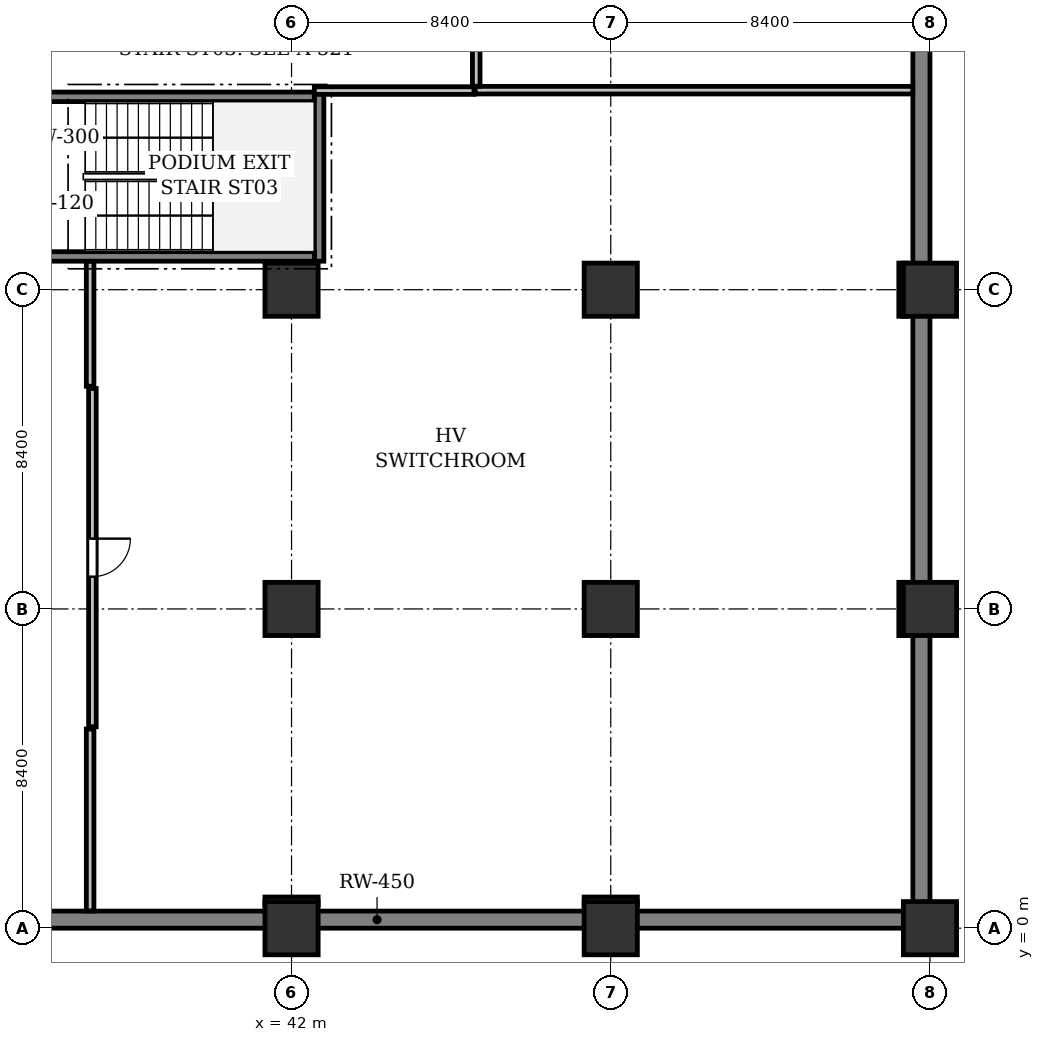
"""IFC4 building model, lengths in metres.
Left out: names, types, materials, properties, quantities, classifications, styles, units other than length and angle.
Written with IfcOpenShell. Run it as: python <this file> out.ifc"""

import sys

from ifc_helpers import new_model, si_unit, direction, frame, frame_2d, origin, origin_2d, place, context, subcontext, project, spatial, rectangle, extrude, element, fill, save


model = new_model("IFC4")
c1 = context("Model", 3, precision=1e-05, world=origin(), true_north=direction((0.0, 1.0)))
c2 = subcontext(c1, "Body", "Model", "MODEL_VIEW")
j1 = project(units=[si_unit("LENGTHUNIT", "METRE"), si_unit("PLANEANGLEUNIT", "RADIAN")], contexts=[c1])
p1 = place(None, origin())
s1 = spatial("IfcSite", under=j1, at=p1, CompositionType="ELEMENT")
p2 = place(p1, origin())
s2 = spatial("IfcBuilding", under=s1, at=p2, CompositionType="ELEMENT")
p3 = place(p2, frame((0.0, 0.0, -9.6)))
s3 = spatial("IfcBuildingStorey", under=s2, at=p3, CompositionType="ELEMENT", Elevation=-9.6)
p4 = place(p3, frame((29.7, 0.225, 0.0), z_axis=(0.0, 0.0, 1.0), x_axis=(1.0, 0.0, 0.0)))
e1 = element("IfcWall", 1, at=p4, inside=s3, PredefinedType="SOLIDWALL", context=c2, shape_type="SweptSolid", body=[
    extrude(rectangle(XDim=29.1, YDim=0.45, at=frame_2d((14.55, 0.0))), origin(), (0.0, 0.0, 1.0), 4.48),
])
p5 = place(p3, frame((58.575, 0.45, 0.0), z_axis=(0.0, 0.0, 1.0), x_axis=(0.0, 1.0, 0.0)))
e2 = element("IfcWall", 2, at=p5, inside=s3, PredefinedType="SOLIDWALL", context=c2, shape_type="SweptSolid", body=[
    extrude(rectangle(XDim=49.5, YDim=0.45, at=frame_2d((24.75, 0.0))), origin(), (0.0, 0.0, 1.0), 4.48),
])
for number, where, z_axis, x_axis in (
    (3, (42.0, 0.0, 0.0), (0.0, 0.0, 1.0), (1.0, 0.0, 0.0)),
    (4, (42.0, 8.4, 0.0), (0.0, 0.0, 1.0), (1.0, 0.0, 0.0)),
    (5, (42.0, 16.8, 0.0), (0.0, 0.0, 1.0), (1.0, 0.0, 0.0)),
    (6, (50.4, 0.0, 0.0), (0.0, 0.0, 1.0), (1.0, 0.0, 0.0)),
    (7, (50.4, 8.4, 0.0), (0.0, 0.0, 1.0), (1.0, 0.0, 0.0)),
    (8, (50.4, 16.8, 0.0), (0.0, 0.0, 1.0), (1.0, 0.0, 0.0)),
    (9, (58.8, 0.0, 0.0), (0.0, 0.0, 1.0), (1.0, 0.0, 0.0)),
    (10, (58.8, 8.4, 0.0), (0.0, 0.0, 1.0), (1.0, 0.0, 0.0)),
    (11, (58.8, 16.8, 0.0), (0.0, 0.0, 1.0), (1.0, 0.0, 0.0)),
):
    element("IfcColumn", number, at=place(p3, frame(where, z_axis=z_axis, x_axis=x_axis)), inside=s3, PredefinedType="COLUMN", context=c2, shape_type="SweptSolid", body=[
        extrude(rectangle(XDim=1.4, YDim=1.4, at=origin_2d()), origin(), (0.0, 0.0, 1.0), 4.8),
    ])
p6 = place(p3, frame((42.725, 17.55, 0.0), z_axis=(0.0, 0.0, 1.0), x_axis=(0.0, 1.0, 0.0)))
e12 = element("IfcWall", 12, at=p6, inside=s3, PredefinedType="SHEAR", context=c2, shape_type="SweptSolid", body=[
    extrude(rectangle(XDim=4.45, YDim=0.25, at=frame_2d((2.225, 0.0))), origin(), (0.0, 0.0, 1.0), 4.48),
])
for number, where, z_axis, x_axis in (
    (13, (34.65, 17.675, 0.0), (0.0, 0.0, 1.0), (1.0, 0.0, 0.0)),
    (14, (34.65, 21.875, 0.0), (0.0, 0.0, 1.0), (1.0, 0.0, 0.0)),
):
    element("IfcWall", number, at=place(p3, frame(where, z_axis=z_axis, x_axis=x_axis)), inside=s3, PredefinedType="SHEAR", context=c2, shape_type="SweptSolid", body=[
        extrude(rectangle(XDim=7.95, YDim=0.25, at=frame_2d((3.975, 0.0))), origin(), (0.0, 0.0, 1.0), 4.48),
    ])
p7 = place(p3, frame((41.3, 0.72, 0.0), z_axis=(0.0, 0.0, 1.0), x_axis=(1.0, 0.0, 0.0)))
e15 = element("IfcWall", 15, at=p7, inside=s3, PredefinedType="PARTITIONING", context=c2, shape_type="SweptSolid", body=[
    extrude(rectangle(XDim=1.4, YDim=0.2, at=frame_2d((0.7, 0.0))), origin(), (0.0, 0.0, 1.0), 3.868),
])
p8 = place(p3, frame((49.7, 0.72, 0.0), z_axis=(0.0, 0.0, 1.0), x_axis=(1.0, 0.0, 0.0)))
e16 = element("IfcWall", 16, at=p8, inside=s3, PredefinedType="PARTITIONING", context=c2, shape_type="SweptSolid", body=[
    extrude(rectangle(XDim=1.4, YDim=0.2, at=frame_2d((0.7, 0.0))), origin(), (0.0, 0.0, 1.0), 3.868),
])
p9 = place(p3, frame((58.08, 7.7, 0.0), z_axis=(0.0, 0.0, 1.0), x_axis=(0.0, 1.0, 0.0)))
e17 = element("IfcWall", 17, at=p9, inside=s3, PredefinedType="PARTITIONING", context=c2, shape_type="SweptSolid", body=[
    extrude(rectangle(XDim=1.4, YDim=0.2, at=frame_2d((0.7, 0.0))), origin(), (0.0, 0.0, 1.0), 3.78),
])
p10 = place(p3, frame((58.08, 16.1, 0.0), z_axis=(0.0, 0.0, 1.0), x_axis=(0.0, 1.0, 0.0)))
e18 = element("IfcWall", 18, at=p10, inside=s3, PredefinedType="PARTITIONING", context=c2, shape_type="SweptSolid", body=[
    extrude(rectangle(XDim=1.4, YDim=0.2, at=frame_2d((0.7, 0.0))), origin(), (0.0, 0.0, 1.0), 3.78),
])
p11 = place(p3, frame((58.346, 22.05, 0.0), z_axis=(0.0, 0.0, 1.0), x_axis=(-1.0, 0.0, 0.0)))
e19 = element("IfcWall", 19, at=p11, inside=s3, PredefinedType="PARTITIONING", context=c2, shape_type="SweptSolid", body=[
    extrude(rectangle(XDim=11.513, YDim=0.2, at=frame_2d((5.756, 0.0))), origin(), (0.0, 0.0, 1.0), 3.868),
])
p12 = place(p3, frame((46.8, 22.04, 0.0), z_axis=(0.0, 0.0, 1.0), x_axis=(-1.0, 0.0, 0.0)))
e20 = element("IfcWall", 20, at=p12, inside=s3, PredefinedType="PARTITIONING", context=c2, shape_type="SweptSolid", body=[
    extrude(rectangle(XDim=4.2, YDim=0.2, at=frame_2d((2.1, 0.0))), origin(), (0.0, 0.0, 1.0), 4.074),
])
p13 = place(p3, frame((36.7, 17.546, 0.0), z_axis=(0.0, 0.0, 1.0), x_axis=(0.0, -1.0, 0.0)))
e21 = element("IfcWall", 21, at=p13, inside=s3, PredefinedType="PARTITIONING", context=c2, shape_type="SweptSolid", body=[
    extrude(rectangle(XDim=3.286, YDim=0.2, at=frame_2d((1.643, 0.0))), origin(), (0.0, 0.0, 1.0), 3.78),
])
p14 = place(p3, frame((36.76, 14.2, 0.0), z_axis=(0.0, 0.0, 1.0), x_axis=(0.0, -1.0, 0.0)))
e22 = element("IfcWall", 22, at=p14, inside=s3, PredefinedType="PARTITIONING", context=c2, shape_type="SweptSolid", body=[
    extrude(rectangle(XDim=8.9, YDim=0.2, at=frame_2d((4.45, 0.0))), origin(), (0.0, 0.0, 1.0), 3.78),
])
p15 = place(p14, frame((3.95, 0.0, 0.0)))
e23 = element("IfcOpeningElement", 23, at=p15, cuts=e22, PredefinedType="OPENING", context=c2, shape_type="SweptSolid", body=[
    extrude(rectangle(XDim=1.0, YDim=2.15, at=frame_2d((0.5, 1.075))), frame((0.0, 0.11, 0.0), z_axis=(0.0, -1.0, 0.0), x_axis=(1.0, 0.0, 0.0)), (0.0, 0.0, 1.0), 0.22),
])
p16 = place(p3, frame((36.7, 5.24, 0.0), z_axis=(0.0, 0.0, 1.0), x_axis=(0.0, -1.0, 0.0)))
e24 = element("IfcWall", 24, at=p16, inside=s3, PredefinedType="PARTITIONING", context=c2, shape_type="SweptSolid", body=[
    extrude(rectangle(XDim=4.786, YDim=0.2, at=frame_2d((2.393, 0.0))), origin(), (0.0, 0.0, 1.0), 4.48),
])
p17 = place(p3, frame((46.86, 24.35, 0.0), z_axis=(0.0, 0.0, 1.0), x_axis=(0.0, -1.0, 0.0)))
e25 = element("IfcWall", 25, at=p17, inside=s3, PredefinedType="PARTITIONING", context=c2, shape_type="SweptSolid", body=[
    extrude(rectangle(XDim=2.196, YDim=0.2, at=frame_2d((1.098, 0.0))), origin(), (0.0, 0.0, 1.0), 4.48),
])
p18 = place(p15, origin())
e26 = element("IfcDoor", 26, at=p18, inside=s3, OperationType="SINGLE_SWING_LEFT", PredefinedType="DOOR", context=c2, shape_type="SweptSolid", body=[
    extrude(rectangle(XDim=1.0, YDim=2.15, at=frame_2d((0.5, 1.075))), frame((0.0, 0.025, 0.0), z_axis=(0.0, -1.0, 0.0), x_axis=(1.0, 0.0, 0.0)), (0.0, 0.0, 1.0), 0.05),
])
fill(e23, e26)
save(model, sys.argv[1])
